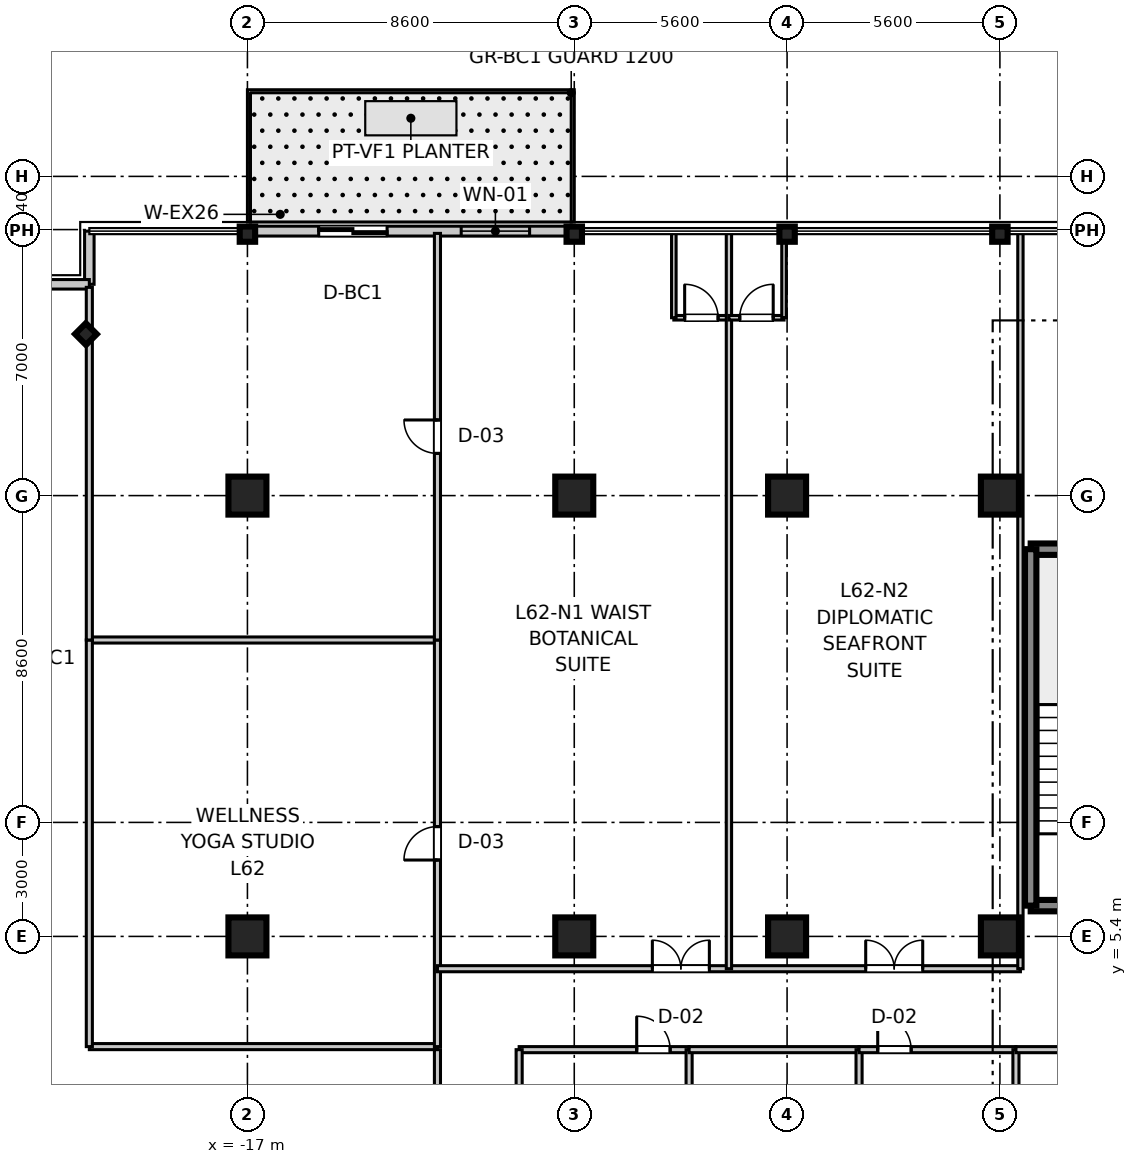
"""IFC4 building model, lengths in metres.
Left out: names, types, materials, properties, quantities, classifications, styles, units other than length and angle.
Written with IfcOpenShell. Run it as: python <this file> out.ifc"""

import sys

from ifc_helpers import new_model, si_unit, direction, frame, frame_2d, origin, origin_2d, place, context, subcontext, project, spatial, rectangle, i_section, extrude, source, transform, mapped, element, fill, save


model = new_model("IFC4")
c1 = context("Model", 3, precision=1e-05, world=origin(), true_north=direction((0.0, 1.0)))
c2 = subcontext(c1, "Body", "Model", "MODEL_VIEW")
j1 = project(units=[si_unit("LENGTHUNIT", "METRE"), si_unit("PLANEANGLEUNIT", "RADIAN")], contexts=[c1])
p1 = place(None, origin())
s1 = spatial("IfcSite", under=j1, at=p1, CompositionType="ELEMENT")
p2 = place(p1, origin())
s2 = spatial("IfcBuilding", under=s1, at=p2, CompositionType="ELEMENT")
p3 = place(p2, frame((0.0, 0.0, 241.9)))
s3 = spatial("IfcBuildingStorey", under=s2, at=p3, CompositionType="ELEMENT", Elevation=241.9)
m1 = source(origin(), c2, "Body", "SweptSolid", [
    extrude(rectangle(XDim=1.0, YDim=1.0, at=origin_2d()), origin(), (0.0, 0.0, 1.0), 3.655),
])
for number, where, z_axis, x_axis in (
    (1, (-17.0, 5.4, 0.0), (0.0, 0.0, 1.0), (1.0, 0.0, 0.0)),
    (2, (-17.0, 17.0, 0.0), (0.0, 0.0, 1.0), (1.0, 0.0, 0.0)),
    (3, (-8.4, 5.4, 0.0), (0.0, 0.0, 1.0), (1.0, 0.0, 0.0)),
    (4, (-8.4, 17.0, 0.0), (0.0, 0.0, 1.0), (1.0, 0.0, 0.0)),
    (5, (-2.8, 5.4, 0.0), (0.0, 0.0, 1.0), (1.0, 0.0, 0.0)),
    (6, (-2.8, 17.0, 0.0), (0.0, 0.0, 1.0), (1.0, 0.0, 0.0)),
    (7, (2.8, 5.4, 0.0), (0.0, 0.0, 1.0), (1.0, 0.0, 0.0)),
    (8, (2.8, 17.0, 0.0), (0.0, 0.0, 1.0), (1.0, 0.0, 0.0)),
):
    element("IfcColumn", number, at=place(p3, frame(where, z_axis=z_axis, x_axis=x_axis)), inside=s3, PredefinedType="COLUMN", context=c2, shape_type="MappedRepresentation", body=[
        mapped(m1, transform((0.0, 0.0, 0.0), scale=1.0)),
    ])
m2 = source(origin(), c2, "Body", "SweptSolid", [
    extrude(i_section(OverallWidth=0.401, OverallDepth=0.406, WebThickness=0.016, FlangeThickness=0.025, at=origin_2d()), origin(), (0.0, 0.0, 1.0), 3.655),
])
for number, where, z_axis, x_axis in (
    (9, (-17.0, 23.88, 0.0), (0.0, 0.0, 1.0), (0.0, 1.0, 0.0)),
    (10, (-8.4, 23.88, 0.0), (0.0, 0.0, 1.0), (0.0, 1.0, 0.0)),
    (11, (-2.8, 23.88, 0.0), (0.0, 0.0, 1.0), (0.0, 1.0, 0.0)),
    (12, (2.8, 23.88, 0.0), (0.0, 0.0, 1.0), (0.0, 1.0, 0.0)),
    (13, (-21.25, 21.25, 0.0), (0.0, 0.0, 1.0), (0.707, 0.707, 0.0)),
):
    element("IfcColumn", number, at=place(p3, frame(where, z_axis=z_axis, x_axis=x_axis)), inside=s3, PredefinedType="COLUMN", context=c2, shape_type="MappedRepresentation", body=[
        mapped(m2, transform((0.0, 0.0, 0.0), scale=1.0)),
    ])
m3 = source(origin(), c2, "Body", "SweptSolid", [
    extrude(rectangle(XDim=3.98, YDim=0.3, at=frame_2d((1.99, 0.0))), origin(), (0.0, 0.0, 1.0), 3.41),
])
for number, where, z_axis, x_axis in (
    (14, (3.61, 6.21, 0.0), (0.0, 0.0, 1.0), (1.0, 0.0, 0.0)),
    (15, (3.61, 15.59, 0.0), (0.0, 0.0, 1.0), (1.0, 0.0, 0.0)),
):
    element("IfcWall", number, at=place(p3, frame(where, z_axis=z_axis, x_axis=x_axis)), inside=s3, PredefinedType="SHEAR", context=c2, shape_type="MappedRepresentation", body=[
        mapped(m3, transform((0.0, 0.0, 0.0), scale=1.0)),
    ])
m4 = source(origin(), c2, "Body", "SweptSolid", [
    extrude(rectangle(XDim=9.38, YDim=0.3, at=frame_2d((4.69, 0.0))), origin(), (0.0, 0.0, 1.0), 3.41),
])
p4 = place(p3, frame((3.61, 6.21, 0.0), z_axis=(0.0, 0.0, 1.0), x_axis=(0.0, 1.0, 0.0)))
e16 = element("IfcWall", 16, at=p4, inside=s3, PredefinedType="SHEAR", context=c2, shape_type="MappedRepresentation", body=[
    mapped(m4, transform((0.0, 0.0, 0.0), scale=1.0)),
])
m5 = source(origin(), c2, "Body", "SweptSolid", [
    extrude(rectangle(XDim=1.4, YDim=0.25, at=frame_2d((0.7, 0.0))), origin(), (0.0, 0.0, 1.0), 3.41),
])
p5 = place(p3, frame((-21.16, 22.56, 0.0), z_axis=(0.0, 0.0, 1.0), x_axis=(0.0, 1.0, 0.0)))
e17 = element("IfcWall", 17, at=p5, inside=s3, PredefinedType="STANDARD", context=c2, shape_type="MappedRepresentation", body=[
    mapped(m5, transform((0.0, 0.0, 0.0), scale=1.0)),
])
m6 = source(origin(), c2, "Body", "SweptSolid", [
    extrude(rectangle(XDim=1.4, YDim=0.25, at=frame_2d((0.7, 0.0))), origin(), (0.0, 0.0, 1.0), 3.41),
])
p6 = place(p3, frame((-22.56, 22.56, 0.0), z_axis=(0.0, 0.0, 1.0), x_axis=(1.0, 0.0, 0.0)))
e18 = element("IfcWall", 18, at=p6, inside=s3, PredefinedType="STANDARD", context=c2, shape_type="MappedRepresentation", body=[
    mapped(m6, transform((0.0, 0.0, 0.0), scale=1.0)),
])
m7 = source(origin(), c2, "Body", "SweptSolid", [
    extrude(rectangle(XDim=8.6, YDim=0.26, at=frame_2d((4.3, 0.0))), origin(), (0.0, 0.0, 1.0), 2.89),
])
p7 = place(p3, frame((-17.0, 23.96, 0.0), z_axis=(0.0, 0.0, 1.0), x_axis=(1.0, 0.0, 0.0)))
e19 = element("IfcWall", 19, at=p7, inside=s3, PredefinedType="STANDARD", context=c2, shape_type="MappedRepresentation", body=[
    mapped(m7, transform((0.0, 0.0, 0.0), scale=1.0)),
])
p8 = place(p7, frame((1.875, 0.0, 0.0)))
e20 = element("IfcOpeningElement", 20, at=p8, cuts=e19, PredefinedType="OPENING", context=c2, shape_type="SweptSolid", body=[
    extrude(rectangle(XDim=1.8, YDim=2.25, at=frame_2d((0.9, 1.125))), frame((0.0, 0.14, 0.0), z_axis=(0.0, -1.0, 0.0), x_axis=(1.0, 0.0, 0.0)), (0.0, 0.0, 1.0), 0.28),
])
p9 = place(p7, frame((5.625, 0.0, 0.85)))
e21 = element("IfcOpeningElement", 21, at=p9, cuts=e19, PredefinedType="OPENING", context=c2, shape_type="SweptSolid", body=[
    extrude(rectangle(XDim=1.8, YDim=1.5, at=frame_2d((0.9, 0.75))), frame((0.0, 0.14, 0.0), z_axis=(0.0, -1.0, 0.0), x_axis=(1.0, 0.0, 0.0)), (0.0, 0.0, 1.0), 0.28),
])
m8 = source(origin(), c2, "Body", "SweptSolid", [
    extrude(rectangle(XDim=9.16, YDim=0.16, at=frame_2d((4.58, 0.0))), origin(), (0.0, 0.0, 1.0), 2.75),
])
for number, where, z_axis, x_axis in (
    (22, (-21.16, 2.5, 0.0), (0.0, 0.0, 1.0), (1.0, 0.0, 0.0)),
    (23, (-21.16, 13.2, 0.0), (0.0, 0.0, 1.0), (1.0, 0.0, 0.0)),
):
    element("IfcWall", number, at=place(p3, frame(where, z_axis=z_axis, x_axis=x_axis)), inside=s3, PredefinedType="PARTITIONING", context=c2, shape_type="MappedRepresentation", body=[
        mapped(m8, transform((0.0, 0.0, 0.0), scale=1.0)),
    ])
m9 = source(origin(), c2, "Body", "SweptSolid", [
    extrude(rectangle(XDim=10.7, YDim=0.16, at=frame_2d((5.35, 0.0))), origin(), (0.0, 0.0, 1.0), 2.75),
])
p10 = place(p3, frame((-21.16, 2.5, 0.0), z_axis=(0.0, 0.0, 1.0), x_axis=(0.0, 1.0, 0.0)))
e24 = element("IfcWall", 24, at=p10, inside=s3, PredefinedType="PARTITIONING", context=c2, shape_type="MappedRepresentation", body=[
    mapped(m9, transform((0.0, 0.0, 0.0), scale=1.0)),
])
p11 = place(p3, frame((-12.0, 2.5, 0.0), z_axis=(0.0, 0.0, 1.0), x_axis=(0.0, 1.0, 0.0)))
e25 = element("IfcWall", 25, at=p11, inside=s3, PredefinedType="PARTITIONING", context=c2, shape_type="MappedRepresentation", body=[
    mapped(m9, transform((0.0, 0.0, 0.0), scale=1.0)),
])
p12 = place(p11, frame((4.91, 0.0, 0.0)))
e26 = element("IfcOpeningElement", 26, at=p12, cuts=e25, PredefinedType="OPENING", context=c2, shape_type="SweptSolid", body=[
    extrude(rectangle(XDim=0.88, YDim=2.1, at=frame_2d((0.44, 1.05))), frame((0.0, 0.09, 0.0), z_axis=(0.0, -1.0, 0.0), x_axis=(1.0, 0.0, 0.0)), (0.0, 0.0, 1.0), 0.18),
])
m10 = source(origin(), c2, "Body", "SweptSolid", [
    extrude(rectangle(XDim=9.28, YDim=0.16, at=frame_2d((4.64, 0.0))), origin(), (0.0, 0.0, 1.0), 2.75),
])
p13 = place(p3, frame((-21.16, 13.2, 0.0), z_axis=(0.0, 0.0, 1.0), x_axis=(0.0, 1.0, 0.0)))
e27 = element("IfcWall", 27, at=p13, inside=s3, PredefinedType="PARTITIONING", context=c2, shape_type="MappedRepresentation", body=[
    mapped(m10, transform((0.0, 0.0, 0.0), scale=1.0)),
])
p14 = place(p3, frame((-12.0, 13.2, 0.0), z_axis=(0.0, 0.0, 1.0), x_axis=(0.0, 1.0, 0.0)))
e28 = element("IfcWall", 28, at=p14, inside=s3, PredefinedType="PARTITIONING", context=c2, shape_type="MappedRepresentation", body=[
    mapped(m9, transform((0.0, 0.0, 0.0), scale=1.0)),
])
p15 = place(p14, frame((4.91, 0.0, 0.0)))
e29 = element("IfcOpeningElement", 29, at=p15, cuts=e28, PredefinedType="OPENING", context=c2, shape_type="SweptSolid", body=[
    extrude(rectangle(XDim=0.88, YDim=2.1, at=frame_2d((0.44, 1.05))), frame((0.0, 0.09, 0.0), z_axis=(0.0, -1.0, 0.0), x_axis=(1.0, 0.0, 0.0)), (0.0, 0.0, 1.0), 0.18),
])
m11 = source(origin(), c2, "Body", "SweptSolid", [
    extrude(rectangle(XDim=15.34, YDim=0.16, at=frame_2d((7.67, 0.0))), origin(), (0.0, 0.0, 1.0), 2.75),
])
p16 = place(p3, frame((-12.0, 4.55, 0.0), z_axis=(0.0, 0.0, 1.0), x_axis=(1.0, 0.0, 0.0)))
e30 = element("IfcWall", 30, at=p16, inside=s3, PredefinedType="PARTITIONING", context=c2, shape_type="MappedRepresentation", body=[
    mapped(m11, transform((0.0, 0.0, 0.0), scale=1.0)),
])
p17 = place(p16, frame((5.655, 0.0, 0.0)))
e31 = element("IfcOpeningElement", 31, at=p17, cuts=e30, PredefinedType="OPENING", context=c2, shape_type="SweptSolid", body=[
    extrude(rectangle(XDim=1.5, YDim=2.15, at=frame_2d((0.75, 1.075))), frame((0.0, 0.09, 0.0), z_axis=(0.0, -1.0, 0.0), x_axis=(1.0, 0.0, 0.0)), (0.0, 0.0, 1.0), 0.18),
])
p18 = place(p16, frame((11.269, 0.0, 0.0)))
e32 = element("IfcOpeningElement", 32, at=p18, cuts=e30, PredefinedType="OPENING", context=c2, shape_type="SweptSolid", body=[
    extrude(rectangle(XDim=1.5, YDim=2.15, at=frame_2d((0.75, 1.075))), frame((0.0, 0.09, 0.0), z_axis=(0.0, -1.0, 0.0), x_axis=(1.0, 0.0, 0.0)), (0.0, 0.0, 1.0), 0.18),
])
m12 = source(origin(), c2, "Body", "SweptSolid", [
    extrude(rectangle(XDim=19.35, YDim=0.14, at=frame_2d((9.675, 0.0))), origin(), (0.0, 0.0, 1.0), 2.75),
])
p19 = place(p3, frame((3.34, 4.55, 0.0), z_axis=(0.0, 0.0, 1.0), x_axis=(0.0, 1.0, 0.0)))
e33 = element("IfcWall", 33, at=p19, inside=s3, PredefinedType="PARTITIONING", context=c2, shape_type="MappedRepresentation", body=[
    mapped(m12, transform((0.0, 0.0, 0.0), scale=1.0)),
])
m13 = source(origin(), c2, "Body", "SweptSolid", [
    extrude(rectangle(XDim=1.45, YDim=0.12, at=frame_2d((0.725, 0.0))), origin(), (0.0, 0.0, 1.0), 2.75),
])
p20 = place(p3, frame((-5.78, 21.68, 0.0), z_axis=(0.0, 0.0, 1.0), x_axis=(1.0, 0.0, 0.0)))
e34 = element("IfcWall", 34, at=p20, inside=s3, PredefinedType="PARTITIONING", context=c2, shape_type="MappedRepresentation", body=[
    mapped(m13, transform((0.0, 0.0, 0.0), scale=1.0)),
])
p21 = place(p20, frame((0.285, 0.0, 0.0)))
e35 = element("IfcOpeningElement", 35, at=p21, cuts=e34, PredefinedType="OPENING", context=c2, shape_type="SweptSolid", body=[
    extrude(rectangle(XDim=0.88, YDim=2.1, at=frame_2d((0.44, 1.05))), frame((0.0, 0.07, 0.0), z_axis=(0.0, -1.0, 0.0), x_axis=(1.0, 0.0, 0.0)), (0.0, 0.0, 1.0), 0.14),
])
m14 = source(origin(), c2, "Body", "SweptSolid", [
    extrude(rectangle(XDim=2.22, YDim=0.12, at=frame_2d((1.11, 0.0))), origin(), (0.0, 0.0, 1.0), 2.75),
])
p22 = place(p3, frame((-5.78, 21.68, 0.0), z_axis=(0.0, 0.0, 1.0), x_axis=(0.0, 1.0, 0.0)))
e36 = element("IfcWall", 36, at=p22, inside=s3, PredefinedType="PARTITIONING", context=c2, shape_type="MappedRepresentation", body=[
    mapped(m14, transform((0.0, 0.0, 0.0), scale=1.0)),
])
p23 = place(p3, frame((-4.33, 4.55, 0.0), z_axis=(0.0, 0.0, 1.0), x_axis=(0.0, 1.0, 0.0)))
e37 = element("IfcWall", 37, at=p23, inside=s3, PredefinedType="PARTITIONING", context=c2, shape_type="MappedRepresentation", body=[
    mapped(m12, transform((0.0, 0.0, 0.0), scale=1.0)),
])
m15 = source(origin(), c2, "Body", "SweptSolid", [
    extrude(rectangle(XDim=1.45, YDim=0.12, at=frame_2d((0.725, 0.0))), origin(), (0.0, 0.0, 1.0), 2.75),
])
p24 = place(p3, frame((-4.33, 21.68, 0.0), z_axis=(0.0, 0.0, 1.0), x_axis=(1.0, 0.0, 0.0)))
e38 = element("IfcWall", 38, at=p24, inside=s3, PredefinedType="PARTITIONING", context=c2, shape_type="MappedRepresentation", body=[
    mapped(m15, transform((0.0, 0.0, 0.0), scale=1.0)),
])
p25 = place(p24, frame((0.285, 0.0, 0.0)))
e39 = element("IfcOpeningElement", 39, at=p25, cuts=e38, PredefinedType="OPENING", context=c2, shape_type="SweptSolid", body=[
    extrude(rectangle(XDim=0.88, YDim=2.1, at=frame_2d((0.44, 1.05))), frame((0.0, 0.07, 0.0), z_axis=(0.0, -1.0, 0.0), x_axis=(1.0, 0.0, 0.0)), (0.0, 0.0, 1.0), 0.14),
])
p26 = place(p3, frame((-2.88, 21.68, 0.0), z_axis=(0.0, 0.0, 1.0), x_axis=(0.0, 1.0, 0.0)))
e40 = element("IfcWall", 40, at=p26, inside=s3, PredefinedType="PARTITIONING", context=c2, shape_type="MappedRepresentation", body=[
    mapped(m14, transform((0.0, 0.0, 0.0), scale=1.0)),
])
m16 = source(origin(), c2, "Body", "SweptSolid", [
    extrude(rectangle(XDim=4.84, YDim=0.16, at=frame_2d((2.42, 0.0))), origin(), (0.0, 0.0, 1.0), 2.75),
])
p27 = place(p3, frame((-12.0, -2.42, 0.0), z_axis=(0.0, 0.0, 1.0), x_axis=(0.0, 1.0, 0.0)))
e41 = element("IfcWall", 41, at=p27, inside=s3, PredefinedType="PARTITIONING", context=c2, shape_type="MappedRepresentation", body=[
    mapped(m16, transform((0.0, 0.0, 0.0), scale=1.0)),
])
p28 = place(p27, frame((1.945, 0.0, 0.0)))
e42 = element("IfcOpeningElement", 42, at=p28, cuts=e41, PredefinedType="OPENING", context=c2, shape_type="SweptSolid", body=[
    extrude(rectangle(XDim=0.95, YDim=2.1, at=frame_2d((0.475, 1.05))), frame((0.0, 0.09, 0.0), z_axis=(0.0, -1.0, 0.0), x_axis=(1.0, 0.0, 0.0)), (0.0, 0.0, 1.0), 0.18),
])
m17 = source(origin(), c2, "Body", "SweptSolid", [
    extrude(rectangle(XDim=4.472, YDim=0.16, at=frame_2d((2.236, 0.0))), origin(), (0.0, 0.0, 1.0), 2.75),
])
p29 = place(p3, frame((-9.85, 2.42, 0.0), z_axis=(0.0, 0.0, 1.0), x_axis=(1.0, 0.0, 0.0)))
e43 = element("IfcWall", 43, at=p29, inside=s3, PredefinedType="PARTITIONING", context=c2, shape_type="MappedRepresentation", body=[
    mapped(m17, transform((0.0, 0.0, 0.0), scale=1.0)),
])
p30 = place(p29, frame((3.093, 0.0, 0.0)))
e44 = element("IfcOpeningElement", 44, at=p30, cuts=e43, PredefinedType="OPENING", context=c2, shape_type="SweptSolid", body=[
    extrude(rectangle(XDim=0.88, YDim=2.1, at=frame_2d((0.44, 1.05))), frame((0.0, 0.09, 0.0), z_axis=(0.0, -1.0, 0.0), x_axis=(1.0, 0.0, 0.0)), (0.0, 0.0, 1.0), 0.18),
])
for number, where, z_axis, x_axis in (
    (45, (-9.85, -2.42, 0.0), (0.0, 0.0, 1.0), (0.0, 1.0, 0.0)),
    (46, (-5.378, -2.42, 0.0), (0.0, 0.0, 1.0), (0.0, 1.0, 0.0)),
):
    element("IfcWall", number, at=place(p3, frame(where, z_axis=z_axis, x_axis=x_axis)), inside=s3, PredefinedType="PARTITIONING", context=c2, shape_type="MappedRepresentation", body=[
        mapped(m16, transform((0.0, 0.0, 0.0), scale=1.0)),
    ])
m18 = source(origin(), c2, "Body", "SweptSolid", [
    extrude(rectangle(XDim=4.472, YDim=0.16, at=frame_2d((2.236, 0.0))), origin(), (0.0, 0.0, 1.0), 2.75),
])
p31 = place(p3, frame((-5.378, 2.42, 0.0), z_axis=(0.0, 0.0, 1.0), x_axis=(1.0, 0.0, 0.0)))
e47 = element("IfcWall", 47, at=p31, inside=s3, PredefinedType="PARTITIONING", context=c2, shape_type="MappedRepresentation", body=[
    mapped(m18, transform((0.0, 0.0, 0.0), scale=1.0)),
])
p32 = place(p3, frame((-0.906, -2.42, 0.0), z_axis=(0.0, 0.0, 1.0), x_axis=(0.0, 1.0, 0.0)))
e48 = element("IfcWall", 48, at=p32, inside=s3, PredefinedType="PARTITIONING", context=c2, shape_type="MappedRepresentation", body=[
    mapped(m16, transform((0.0, 0.0, 0.0), scale=1.0)),
])
m19 = source(origin(), c2, "Body", "SweptSolid", [
    extrude(rectangle(XDim=4.128, YDim=0.16, at=frame_2d((2.064, 0.0))), origin(), (0.0, 0.0, 1.0), 2.75),
])
p33 = place(p3, frame((-0.906, 2.42, 0.0), z_axis=(0.0, 0.0, 1.0), x_axis=(1.0, 0.0, 0.0)))
e49 = element("IfcWall", 49, at=p33, inside=s3, PredefinedType="PARTITIONING", context=c2, shape_type="MappedRepresentation", body=[
    mapped(m19, transform((0.0, 0.0, 0.0), scale=1.0)),
])
p34 = place(p33, frame((0.491, 0.0, 0.0)))
e50 = element("IfcOpeningElement", 50, at=p34, cuts=e49, PredefinedType="OPENING", context=c2, shape_type="SweptSolid", body=[
    extrude(rectangle(XDim=0.88, YDim=2.1, at=frame_2d((0.44, 1.05))), frame((0.0, 0.09, 0.0), z_axis=(0.0, -1.0, 0.0), x_axis=(1.0, 0.0, 0.0)), (0.0, 0.0, 1.0), 0.18),
])
p35 = place(p3, frame((3.222, -2.42, 0.0), z_axis=(0.0, 0.0, 1.0), x_axis=(0.0, 1.0, 0.0)))
e51 = element("IfcWall", 51, at=p35, inside=s3, PredefinedType="PARTITIONING", context=c2, shape_type="MappedRepresentation", body=[
    mapped(m16, transform((0.0, 0.0, 0.0), scale=1.0)),
])
m20 = source(origin(), c2, "Body", "SweptSolid", [
    extrude(rectangle(XDim=4.128, YDim=0.16, at=frame_2d((2.064, 0.0))), origin(), (0.0, 0.0, 1.0), 2.75),
])
p36 = place(p3, frame((3.222, 2.42, 0.0), z_axis=(0.0, 0.0, 1.0), x_axis=(1.0, 0.0, 0.0)))
e52 = element("IfcWall", 52, at=p36, inside=s3, PredefinedType="PARTITIONING", context=c2, shape_type="MappedRepresentation", body=[
    mapped(m20, transform((0.0, 0.0, 0.0), scale=1.0)),
])
m21 = source(origin(), c2, "Body", "SweptSolid", [
    extrude(rectangle(XDim=0.88, YDim=2.1, at=frame_2d((0.44, 1.05))), frame((0.0, 0.025, 0.0), z_axis=(0.0, -1.0, 0.0), x_axis=(1.0, 0.0, 0.0)), (0.0, 0.0, 1.0), 0.05),
])
p37 = place(p12, origin())
e53 = element("IfcDoor", 53, at=p37, inside=s3, OperationType="SINGLE_SWING_LEFT", PredefinedType="DOOR", context=c2, shape_type="MappedRepresentation", body=[
    mapped(m21, transform((0.0, 0.0, 0.0), scale=1.0)),
])
fill(e26, e53)
p38 = place(p15, origin())
e54 = element("IfcDoor", 54, at=p38, inside=s3, OperationType="SINGLE_SWING_RIGHT", PredefinedType="DOOR", context=c2, shape_type="MappedRepresentation", body=[
    mapped(m21, transform((0.0, 0.0, 0.0), scale=1.0)),
])
fill(e29, e54)
p39 = place(p21, origin())
e55 = element("IfcDoor", 55, at=p39, inside=s3, OperationType="SINGLE_SWING_LEFT", PredefinedType="DOOR", context=c2, shape_type="MappedRepresentation", body=[
    mapped(m21, transform((0.0, 0.0, 0.0), scale=1.0)),
])
fill(e35, e55)
m22 = source(origin(), c2, "Body", "SweptSolid", [
    extrude(rectangle(XDim=1.5, YDim=2.15, at=frame_2d((0.75, 1.075))), frame((0.0, 0.025, 0.0), z_axis=(0.0, -1.0, 0.0), x_axis=(1.0, 0.0, 0.0)), (0.0, 0.0, 1.0), 0.05),
])
p40 = place(p17, origin())
e56 = element("IfcDoor", 56, at=p40, inside=s3, OperationType="DOUBLE_DOOR_SINGLE_SWING", PredefinedType="DOOR", context=c2, shape_type="MappedRepresentation", body=[
    mapped(m22, transform((0.0, 0.0, 0.0), scale=1.0)),
])
fill(e31, e56)
p41 = place(p25, origin())
e57 = element("IfcDoor", 57, at=p41, inside=s3, OperationType="SINGLE_SWING_RIGHT", PredefinedType="DOOR", context=c2, shape_type="MappedRepresentation", body=[
    mapped(m21, transform((0.0, 0.0, 0.0), scale=1.0)),
])
fill(e39, e57)
p42 = place(p18, origin())
e58 = element("IfcDoor", 58, at=p42, inside=s3, OperationType="DOUBLE_DOOR_SINGLE_SWING", PredefinedType="DOOR", context=c2, shape_type="MappedRepresentation", body=[
    mapped(m22, transform((0.0, 0.0, 0.0), scale=1.0)),
])
fill(e32, e58)
p43 = place(p30, frame((0.88, 0.0, 0.0), z_axis=(0.0, 0.0, 1.0), x_axis=(-1.0, 0.0, 0.0)))
e59 = element("IfcDoor", 59, at=p43, inside=s3, OperationType="SINGLE_SWING_LEFT", PredefinedType="DOOR", context=c2, shape_type="MappedRepresentation", body=[
    mapped(m21, transform((0.0, 0.0, 0.0), scale=1.0)),
])
fill(e44, e59)
p44 = place(p34, frame((0.88, 0.0, 0.0), z_axis=(0.0, 0.0, 1.0), x_axis=(-1.0, 0.0, 0.0)))
e60 = element("IfcDoor", 60, at=p44, inside=s3, OperationType="SINGLE_SWING_LEFT", PredefinedType="DOOR", context=c2, shape_type="MappedRepresentation", body=[
    mapped(m21, transform((0.0, 0.0, 0.0), scale=1.0)),
])
fill(e50, e60)
m23 = source(origin(), c2, "Body", "SweptSolid", [
    extrude(rectangle(XDim=1.8, YDim=2.25, at=frame_2d((0.9, 1.125))), frame((0.0, 0.025, 0.0), z_axis=(0.0, -1.0, 0.0), x_axis=(1.0, 0.0, 0.0)), (0.0, 0.0, 1.0), 0.05),
])
p45 = place(p8, origin())
e61 = element("IfcDoor", 61, at=p45, inside=s3, OperationType="DOUBLE_DOOR_SLIDING", PredefinedType="DOOR", context=c2, shape_type="MappedRepresentation", body=[
    mapped(m23, transform((0.0, 0.0, 0.0), scale=1.0)),
])
fill(e20, e61)
m24 = source(origin(), c2, "Body", "SweptSolid", [
    extrude(rectangle(XDim=1.8, YDim=1.5, at=frame_2d((0.9, 0.75))), frame((0.0, 0.03, 0.0), z_axis=(0.0, -1.0, 0.0), x_axis=(1.0, 0.0, 0.0)), (0.0, 0.0, 1.0), 0.06),
])
p46 = place(p9, origin())
e62 = element("IfcWindow", 62, at=p46, inside=s3, PartitioningType="SINGLE_PANEL", PredefinedType="WINDOW", context=c2, shape_type="MappedRepresentation", body=[
    mapped(m24, transform((0.0, 0.0, 0.0), scale=1.0)),
])
fill(e21, e62)
save(model, sys.argv[1])
